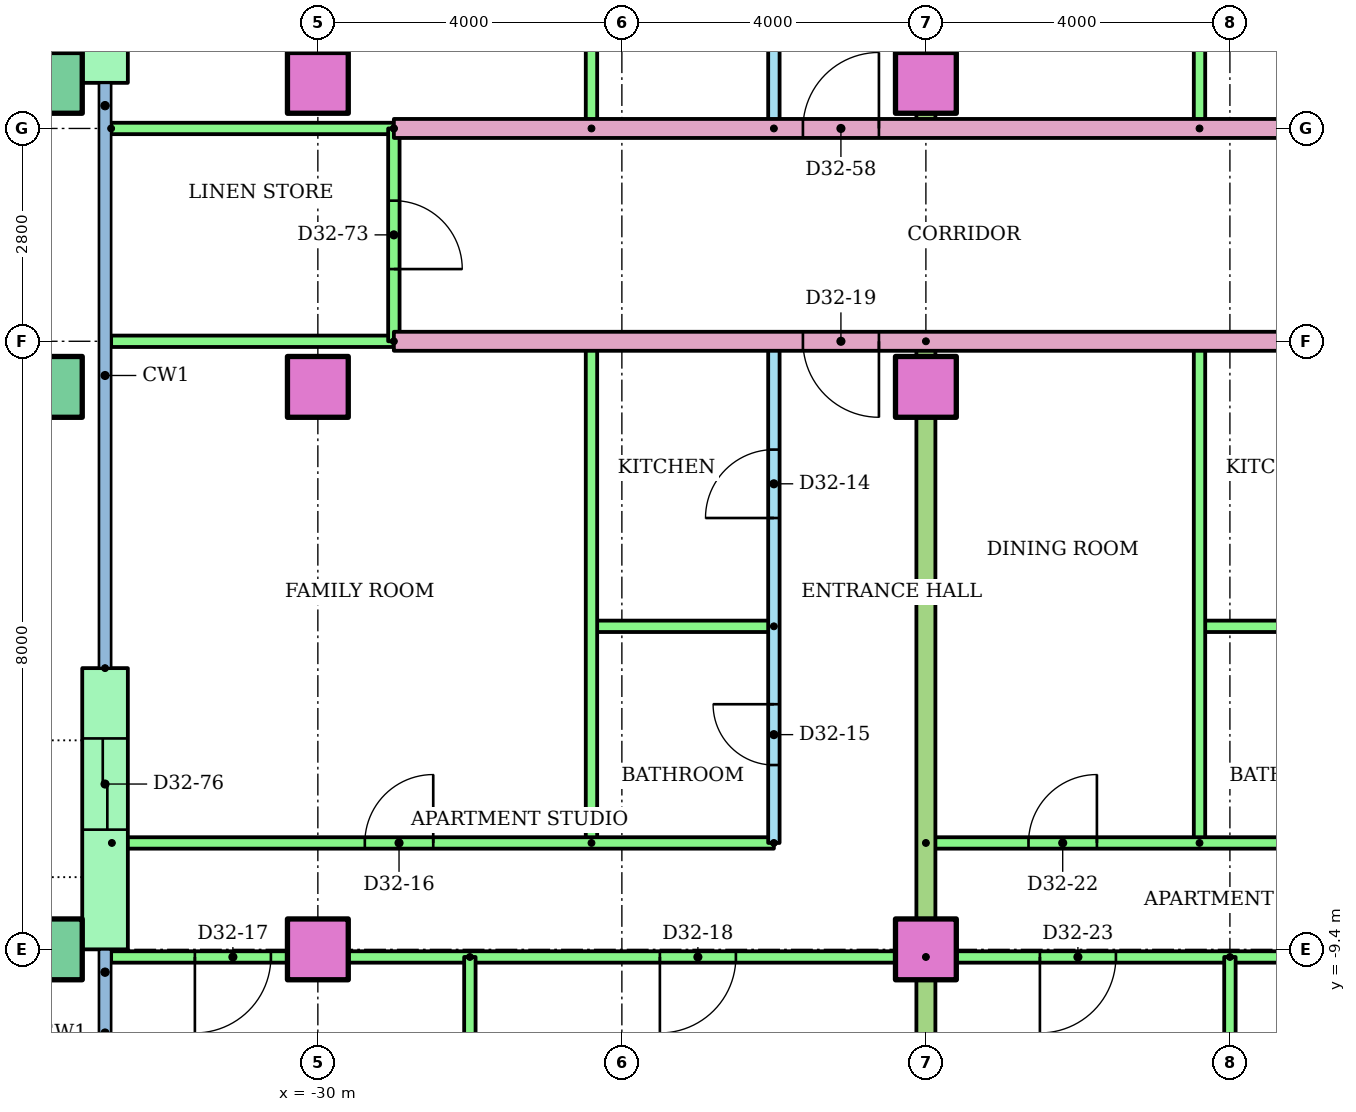
"""IFC4 building model, lengths in metres.
Left out: names, types, materials, properties, quantities, classifications, styles, units other than length and angle.
Written with IfcOpenShell. Run it as: python <this file> out.ifc"""

import sys

from ifc_helpers import new_model, si_unit, direction, frame, frame_2d, origin, origin_2d, place, context, subcontext, project, spatial, rectangle, hollow_rectangle, extrude, element, fill, save


model = new_model("IFC4")
c1 = context("Model", 3, precision=1e-05, world=origin(), true_north=direction((0.0, 1.0)))
c2 = subcontext(c1, "Body", "Model", "MODEL_VIEW")
j1 = project(units=[si_unit("LENGTHUNIT", "METRE"), si_unit("PLANEANGLEUNIT", "RADIAN")], contexts=[c1])
p1 = place(None, origin())
s1 = spatial("IfcSite", under=j1, at=p1, CompositionType="ELEMENT")
p2 = place(p1, origin())
s2 = spatial("IfcBuilding", under=s1, at=p2, CompositionType="ELEMENT")
p3 = place(p2, frame((0.0, 0.0, 126.2)))
s3 = spatial("IfcBuildingStorey", under=s2, at=p3, CompositionType="ELEMENT", Elevation=126.2)
p4 = place(p3, frame((-33.5, -9.4, 0.0)))
e1 = element("IfcColumn", 1, at=p4, inside=s3, PredefinedType="COLUMN", context=c2, shape_type="SweptSolid", body=[
    extrude(hollow_rectangle(XDim=0.8, YDim=0.8, WallThickness=0.04, at=origin_2d()), origin(), (0.0, 0.0, 1.0), 3.2),
])
for number, where in (
    (2, (-30.0, -9.4, 0.0)),
    (3, (-22.0, -9.4, 0.0)),
):
    element("IfcColumn", number, at=place(p3, frame(where)), inside=s3, PredefinedType="COLUMN", context=c2, shape_type="SweptSolid", body=[
        extrude(rectangle(XDim=0.8, YDim=0.8, at=origin_2d()), origin(), (0.0, 0.0, 1.0), 3.2),
    ])
p5 = place(p3, frame((-33.5, -2.0, 0.0)))
e4 = element("IfcColumn", 4, at=p5, inside=s3, PredefinedType="COLUMN", context=c2, shape_type="SweptSolid", body=[
    extrude(hollow_rectangle(XDim=0.8, YDim=0.8, WallThickness=0.04, at=origin_2d()), origin(), (0.0, 0.0, 1.0), 3.2),
])
for number, where in (
    (5, (-30.0, -2.0, 0.0)),
    (6, (-22.0, -2.0, 0.0)),
):
    element("IfcColumn", number, at=place(p3, frame(where)), inside=s3, PredefinedType="COLUMN", context=c2, shape_type="SweptSolid", body=[
        extrude(rectangle(XDim=0.8, YDim=0.8, at=origin_2d()), origin(), (0.0, 0.0, 1.0), 3.2),
    ])
p6 = place(p3, frame((-33.5, 2.0, 0.0)))
e7 = element("IfcColumn", 7, at=p6, inside=s3, PredefinedType="COLUMN", context=c2, shape_type="SweptSolid", body=[
    extrude(hollow_rectangle(XDim=0.8, YDim=0.8, WallThickness=0.04, at=origin_2d()), origin(), (0.0, 0.0, 1.0), 3.2),
])
for number, where in (
    (8, (-30.0, 2.0, 0.0)),
    (9, (-22.0, 2.0, 0.0)),
):
    element("IfcColumn", number, at=place(p3, frame(where)), inside=s3, PredefinedType="COLUMN", context=c2, shape_type="SweptSolid", body=[
        extrude(rectangle(XDim=0.8, YDim=0.8, at=origin_2d()), origin(), (0.0, 0.0, 1.0), 3.2),
    ])
p7 = place(p3, frame((-32.8, 6.5, 0.0), z_axis=(0.0, 0.0, 1.0), x_axis=(0.0, -1.0, 0.0)))
e10 = element("IfcWall", 10, at=p7, inside=s3, PredefinedType="STANDARD", context=c2, shape_type="SweptSolid", body=[
    extrude(rectangle(XDim=4.5, YDim=0.6, at=frame_2d((2.25, 0.0))), origin(), (0.0, 0.0, 1.0), 2.92),
])
p8 = place(p7, frame((1.65, 0.0, 0.0)))
e11 = element("IfcOpeningElement", 11, at=p8, cuts=e10, PredefinedType="OPENING", context=c2, shape_type="SweptSolid", body=[
    extrude(rectangle(XDim=1.2, YDim=2.1, at=frame_2d((0.6, 1.05))), frame((0.0, 0.31, 0.0), z_axis=(0.0, -1.0, 0.0), x_axis=(1.0, 0.0, 0.0)), (0.0, 0.0, 1.0), 0.62),
])
p9 = place(p3, frame((-32.8, -5.7, 0.0), z_axis=(0.0, 0.0, 1.0), x_axis=(0.0, -1.0, 0.0)))
e12 = element("IfcWall", 12, at=p9, inside=s3, PredefinedType="STANDARD", context=c2, shape_type="SweptSolid", body=[
    extrude(rectangle(XDim=3.7, YDim=0.6, at=frame_2d((1.85, 0.0))), origin(), (0.0, 0.0, 1.0), 2.92),
])
p10 = place(p9, frame((0.925, 0.0, 0.0)))
e13 = element("IfcOpeningElement", 13, at=p10, cuts=e12, PredefinedType="OPENING", context=c2, shape_type="SweptSolid", body=[
    extrude(rectangle(XDim=1.2, YDim=2.1, at=frame_2d((0.6, 1.05))), frame((0.0, 0.31, 0.0), z_axis=(0.0, -1.0, 0.0), x_axis=(1.0, 0.0, 0.0)), (0.0, 0.0, 1.0), 0.62),
])
p11 = place(p3, frame((-24.0, -8.0, 0.0), z_axis=(0.0, 0.0, 1.0), x_axis=(0.0, 1.0, 0.0)))
e14 = element("IfcWall", 14, at=p11, inside=s3, PredefinedType="PARTITIONING", context=c2, shape_type="SweptSolid", body=[
    extrude(rectangle(XDim=6.6, YDim=0.15, at=frame_2d((3.3, 0.0))), origin(), (0.0, 0.0, 1.0), 2.4),
])
p12 = place(p11, frame((4.275, 0.0, 0.0)))
e15 = element("IfcOpeningElement", 15, at=p12, cuts=e14, PredefinedType="OPENING", context=c2, shape_type="SweptSolid", body=[
    extrude(rectangle(XDim=0.9, YDim=2.1, at=frame_2d((0.45, 1.05))), frame((0.0, 0.085, 0.0), z_axis=(0.0, -1.0, 0.0), x_axis=(1.0, 0.0, 0.0)), (0.0, 0.0, 1.0), 0.17),
])
p13 = place(p11, frame((1.025, 0.0, 0.0)))
e16 = element("IfcOpeningElement", 16, at=p13, cuts=e14, PredefinedType="OPENING", context=c2, shape_type="SweptSolid", body=[
    extrude(rectangle(XDim=0.8, YDim=2.1, at=frame_2d((0.4, 1.05))), frame((0.0, 0.085, 0.0), z_axis=(0.0, -1.0, 0.0), x_axis=(1.0, 0.0, 0.0)), (0.0, 0.0, 1.0), 0.17),
])
p14 = place(p3, frame((-24.0, -5.15, 0.0), z_axis=(0.0, 0.0, 1.0), x_axis=(-1.0, 0.0, 0.0)))
e17 = element("IfcWall", 17, at=p14, inside=s3, PredefinedType="PARTITIONING", context=c2, shape_type="SweptSolid", body=[
    extrude(rectangle(XDim=2.4, YDim=0.15, at=frame_2d((1.2, 0.0))), origin(), (0.0, 0.0, 1.0), 2.4),
])
p15 = place(p3, frame((-26.4, -8.0, 0.0), z_axis=(0.0, 0.0, 1.0), x_axis=(0.0, 1.0, 0.0)))
e18 = element("IfcWall", 18, at=p15, inside=s3, PredefinedType="PARTITIONING", context=c2, shape_type="SweptSolid", body=[
    extrude(rectangle(XDim=6.6, YDim=0.15, at=frame_2d((3.3, 0.0))), origin(), (0.0, 0.0, 1.0), 2.4),
])
p16 = place(p3, frame((-32.71, -8.0, 0.0)))
e19 = element("IfcWall", 19, at=p16, inside=s3, PredefinedType="PARTITIONING", context=c2, shape_type="SweptSolid", body=[
    extrude(rectangle(XDim=8.71, YDim=0.15, at=frame_2d((4.355, 0.0))), origin(), (0.0, 0.0, 1.0), 2.4),
])
p17 = place(p16, frame((3.328, 0.0, 0.0)))
e20 = element("IfcOpeningElement", 20, at=p17, cuts=e19, PredefinedType="OPENING", context=c2, shape_type="SweptSolid", body=[
    extrude(rectangle(XDim=0.9, YDim=2.1, at=frame_2d((0.45, 1.05))), frame((0.0, 0.085, 0.0), z_axis=(0.0, -1.0, 0.0), x_axis=(1.0, 0.0, 0.0)), (0.0, 0.0, 1.0), 0.17),
])
p18 = place(p3, frame((-22.0, -9.5, 0.0), z_axis=(0.0, 0.0, 1.0), x_axis=(-1.0, 0.0, 0.0)))
e21 = element("IfcWall", 21, at=p18, inside=s3, PredefinedType="PARTITIONING", context=c2, shape_type="SweptSolid", body=[
    extrude(rectangle(XDim=10.72, YDim=0.15, at=frame_2d((5.36, 0.0))), origin(), (0.0, 0.0, 1.0), 2.4),
])
p19 = place(p18, frame((8.618, 0.0, 0.0)))
e22 = element("IfcOpeningElement", 22, at=p19, cuts=e21, PredefinedType="OPENING", context=c2, shape_type="SweptSolid", body=[
    extrude(rectangle(XDim=1.0, YDim=2.1, at=frame_2d((0.5, 1.05))), frame((0.0, 0.085, 0.0), z_axis=(0.0, -1.0, 0.0), x_axis=(1.0, 0.0, 0.0)), (0.0, 0.0, 1.0), 0.17),
])
p20 = place(p18, frame((2.5, 0.0, 0.0)))
e23 = element("IfcOpeningElement", 23, at=p20, cuts=e21, PredefinedType="OPENING", context=c2, shape_type="SweptSolid", body=[
    extrude(rectangle(XDim=1.0, YDim=2.1, at=frame_2d((0.5, 1.05))), frame((0.0, 0.085, 0.0), z_axis=(0.0, -1.0, 0.0), x_axis=(1.0, 0.0, 0.0)), (0.0, 0.0, 1.0), 0.17),
])
p21 = place(p3, frame((-28.0, -9.5, 0.0), z_axis=(0.0, 0.0, 1.0), x_axis=(0.0, -1.0, 0.0)))
e24 = element("IfcWall", 24, at=p21, inside=s3, PredefinedType="PARTITIONING", context=c2, shape_type="SweptSolid", body=[
    extrude(rectangle(XDim=5.02, YDim=0.15, at=frame_2d((2.51, 0.0))), origin(), (0.0, 0.0, 1.0), 2.4),
])
p22 = place(p3, frame((-16.0, -5.15, 0.0), z_axis=(0.0, 0.0, 1.0), x_axis=(-1.0, 0.0, 0.0)))
e25 = element("IfcWall", 25, at=p22, inside=s3, PredefinedType="PARTITIONING", context=c2, shape_type="SweptSolid", body=[
    extrude(rectangle(XDim=2.4, YDim=0.15, at=frame_2d((1.2, 0.0))), origin(), (0.0, 0.0, 1.0), 2.4),
])
p23 = place(p3, frame((-18.4, -8.0, 0.0), z_axis=(0.0, 0.0, 1.0), x_axis=(0.0, 1.0, 0.0)))
e26 = element("IfcWall", 26, at=p23, inside=s3, PredefinedType="PARTITIONING", context=c2, shape_type="SweptSolid", body=[
    extrude(rectangle(XDim=6.6, YDim=0.15, at=frame_2d((3.3, 0.0))), origin(), (0.0, 0.0, 1.0), 2.4),
])
p24 = place(p3, frame((-22.0, -8.0, 0.0)))
e27 = element("IfcWall", 27, at=p24, inside=s3, PredefinedType="PARTITIONING", context=c2, shape_type="SweptSolid", body=[
    extrude(rectangle(XDim=6.0, YDim=0.15, at=frame_2d((3.0, 0.0))), origin(), (0.0, 0.0, 1.0), 2.4),
])
p25 = place(p24, frame((1.35, 0.0, 0.0)))
e28 = element("IfcOpeningElement", 28, at=p25, cuts=e27, PredefinedType="OPENING", context=c2, shape_type="SweptSolid", body=[
    extrude(rectangle(XDim=0.9, YDim=2.1, at=frame_2d((0.45, 1.05))), frame((0.0, 0.085, 0.0), z_axis=(0.0, -1.0, 0.0), x_axis=(1.0, 0.0, 0.0)), (0.0, 0.0, 1.0), 0.17),
])
p26 = place(p3, frame((-14.0, -9.5, 0.0), z_axis=(0.0, 0.0, 1.0), x_axis=(-1.0, 0.0, 0.0)))
e29 = element("IfcWall", 29, at=p26, inside=s3, PredefinedType="PARTITIONING", context=c2, shape_type="SweptSolid", body=[
    extrude(rectangle(XDim=8.0, YDim=0.15, at=frame_2d((4.0, 0.0))), origin(), (0.0, 0.0, 1.0), 2.4),
])
p27 = place(p26, frame((5.5, 0.0, 0.0)))
e30 = element("IfcOpeningElement", 30, at=p27, cuts=e29, PredefinedType="OPENING", context=c2, shape_type="SweptSolid", body=[
    extrude(rectangle(XDim=1.0, YDim=2.1, at=frame_2d((0.5, 1.05))), frame((0.0, 0.085, 0.0), z_axis=(0.0, -1.0, 0.0), x_axis=(1.0, 0.0, 0.0)), (0.0, 0.0, 1.0), 0.17),
])
p28 = place(p26, frame((1.5, 0.0, 0.0)))
e31 = element("IfcOpeningElement", 31, at=p28, cuts=e29, PredefinedType="OPENING", context=c2, shape_type="SweptSolid", body=[
    extrude(rectangle(XDim=1.0, YDim=2.1, at=frame_2d((0.5, 1.05))), frame((0.0, 0.085, 0.0), z_axis=(0.0, -1.0, 0.0), x_axis=(1.0, 0.0, 0.0)), (0.0, 0.0, 1.0), 0.17),
])
p29 = place(p3, frame((-18.0, -9.5, 0.0), z_axis=(0.0, 0.0, 1.0), x_axis=(0.0, -1.0, 0.0)))
e32 = element("IfcWall", 32, at=p29, inside=s3, PredefinedType="PARTITIONING", context=c2, shape_type="SweptSolid", body=[
    extrude(rectangle(XDim=6.821, YDim=0.15, at=frame_2d((3.411, 0.0))), origin(), (0.0, 0.0, 1.0), 2.4),
])
p30 = place(p3, frame((-22.0, -1.4, 0.0), z_axis=(0.0, 0.0, 1.0), x_axis=(0.0, -1.0, 0.0)))
e33 = element("IfcWall", 33, at=p30, inside=s3, PredefinedType="PARTITIONING", context=c2, shape_type="SweptSolid", body=[
    extrude(rectangle(XDim=14.91, YDim=0.25, at=frame_2d((7.455, 0.0))), origin(), (0.0, 0.0, 1.0), 2.4),
])
p31 = place(p3, frame((-14.0, -1.4, 0.0), z_axis=(0.0, 0.0, 1.0), x_axis=(-1.0, 0.0, 0.0)))
e34 = element("IfcWall", 34, at=p31, inside=s3, PredefinedType="PARTITIONING", context=c2, shape_type="SweptSolid", body=[
    extrude(rectangle(XDim=15.0, YDim=0.25, at=frame_2d((7.5, 0.0))), origin(), (0.0, 0.0, 1.0), 2.4),
])
p32 = place(p31, frame((8.618, 0.0, 0.0)))
e35 = element("IfcOpeningElement", 35, at=p32, cuts=e34, PredefinedType="OPENING", context=c2, shape_type="SweptSolid", body=[
    extrude(rectangle(XDim=1.0, YDim=2.1, at=frame_2d((0.5, 1.05))), frame((0.0, 0.135, 0.0), z_axis=(0.0, -1.0, 0.0), x_axis=(1.0, 0.0, 0.0)), (0.0, 0.0, 1.0), 0.27),
])
p33 = place(p31, frame((0.618, 0.0, 0.0)))
e36 = element("IfcOpeningElement", 36, at=p33, cuts=e34, PredefinedType="OPENING", context=c2, shape_type="SweptSolid", body=[
    extrude(rectangle(XDim=1.0, YDim=2.1, at=frame_2d((0.5, 1.05))), frame((0.0, 0.135, 0.0), z_axis=(0.0, -1.0, 0.0), x_axis=(1.0, 0.0, 0.0)), (0.0, 0.0, 1.0), 0.27),
])
p34 = place(p3, frame((-29.0, -1.4, 0.0), z_axis=(0.0, 0.0, 1.0), x_axis=(-1.0, 0.0, 0.0)))
e37 = element("IfcWall", 37, at=p34, inside=s3, PredefinedType="PARTITIONING", context=c2, shape_type="SweptSolid", body=[
    extrude(rectangle(XDim=3.72, YDim=0.15, at=frame_2d((1.86, 0.0))), origin(), (0.0, 0.0, 1.0), 2.4),
])
p35 = place(p3, frame((-24.0, 1.4, 0.0), z_axis=(0.0, 0.0, 1.0), x_axis=(0.0, 1.0, 0.0)))
e38 = element("IfcWall", 38, at=p35, inside=s3, PredefinedType="PARTITIONING", context=c2, shape_type="SweptSolid", body=[
    extrude(rectangle(XDim=9.0, YDim=0.15, at=frame_2d((4.5, 0.0))), origin(), (0.0, 0.0, 1.0), 2.4),
])
p36 = place(p35, frame((2.05, 0.0, 0.0)))
e39 = element("IfcOpeningElement", 39, at=p36, cuts=e38, PredefinedType="OPENING", context=c2, shape_type="SweptSolid", body=[
    extrude(rectangle(XDim=0.9, YDim=2.1, at=frame_2d((0.45, 1.05))), frame((0.0, 0.085, 0.0), z_axis=(0.0, -1.0, 0.0), x_axis=(1.0, 0.0, 0.0)), (0.0, 0.0, 1.0), 0.17),
])
p37 = place(p35, frame((6.6, 0.0, 0.0)))
e40 = element("IfcOpeningElement", 40, at=p37, cuts=e38, PredefinedType="OPENING", context=c2, shape_type="SweptSolid", body=[
    extrude(rectangle(XDim=0.8, YDim=2.1, at=frame_2d((0.4, 1.05))), frame((0.0, 0.085, 0.0), z_axis=(0.0, -1.0, 0.0), x_axis=(1.0, 0.0, 0.0)), (0.0, 0.0, 1.0), 0.17),
])
for number, where, z_axis, x_axis in (
    (41, (-26.4, 1.4, 0.0), (0.0, 0.0, 1.0), (0.0, 1.0, 0.0)),
    (42, (-18.4, 1.4, 0.0), (0.0, 0.0, 1.0), (0.0, 1.0, 0.0)),
):
    element("IfcWall", number, at=place(p3, frame(where, z_axis=z_axis, x_axis=x_axis)), inside=s3, PredefinedType="PARTITIONING", context=c2, shape_type="SweptSolid", body=[
        extrude(rectangle(XDim=9.0, YDim=0.15, at=frame_2d((4.5, 0.0))), origin(), (0.0, 0.0, 1.0), 2.4),
    ])
p38 = place(p3, frame((-22.0, 18.721, 0.0), z_axis=(0.0, 0.0, 1.0), x_axis=(0.0, -1.0, 0.0)))
e43 = element("IfcWall", 43, at=p38, inside=s3, PredefinedType="PARTITIONING", context=c2, shape_type="SweptSolid", body=[
    extrude(rectangle(XDim=17.321, YDim=0.25, at=frame_2d((8.661, 0.0))), origin(), (0.0, 0.0, 1.0), 2.4),
])
p39 = place(p3, frame((-29.0, 1.4, 0.0)))
e44 = element("IfcWall", 44, at=p39, inside=s3, PredefinedType="PARTITIONING", context=c2, shape_type="SweptSolid", body=[
    extrude(rectangle(XDim=15.0, YDim=0.25, at=frame_2d((7.5, 0.0))), origin(), (0.0, 0.0, 1.0), 2.4),
])
p40 = place(p39, frame((5.382, 0.0, 0.0)))
e45 = element("IfcOpeningElement", 45, at=p40, cuts=e44, PredefinedType="OPENING", context=c2, shape_type="SweptSolid", body=[
    extrude(rectangle(XDim=1.0, YDim=2.1, at=frame_2d((0.5, 1.05))), frame((0.0, 0.135, 0.0), z_axis=(0.0, -1.0, 0.0), x_axis=(1.0, 0.0, 0.0)), (0.0, 0.0, 1.0), 0.27),
])
p41 = place(p39, frame((13.5, 0.0, 0.0)))
e46 = element("IfcOpeningElement", 46, at=p41, cuts=e44, PredefinedType="OPENING", context=c2, shape_type="SweptSolid", body=[
    extrude(rectangle(XDim=1.0, YDim=2.1, at=frame_2d((0.5, 1.05))), frame((0.0, 0.135, 0.0), z_axis=(0.0, -1.0, 0.0), x_axis=(1.0, 0.0, 0.0)), (0.0, 0.0, 1.0), 0.27),
])
p42 = place(p3, frame((-32.72, 1.4, 0.0)))
e47 = element("IfcWall", 47, at=p42, inside=s3, PredefinedType="PARTITIONING", context=c2, shape_type="SweptSolid", body=[
    extrude(rectangle(XDim=3.72, YDim=0.15, at=frame_2d((1.86, 0.0))), origin(), (0.0, 0.0, 1.0), 2.4),
])
p43 = place(p3, frame((-29.0, 1.4, 0.0), z_axis=(0.0, 0.0, 1.0), x_axis=(0.0, -1.0, 0.0)))
e48 = element("IfcWall", 48, at=p43, inside=s3, PredefinedType="PARTITIONING", context=c2, shape_type="SweptSolid", body=[
    extrude(rectangle(XDim=2.8, YDim=0.15, at=frame_2d((1.4, 0.0))), origin(), (0.0, 0.0, 1.0), 2.4),
])
p44 = place(p43, frame((0.95, 0.0, 0.0)))
e49 = element("IfcOpeningElement", 49, at=p44, cuts=e48, PredefinedType="OPENING", context=c2, shape_type="SweptSolid", body=[
    extrude(rectangle(XDim=0.9, YDim=2.1, at=frame_2d((0.45, 1.05))), frame((0.0, 0.085, 0.0), z_axis=(0.0, -1.0, 0.0), x_axis=(1.0, 0.0, 0.0)), (0.0, 0.0, 1.0), 0.17),
])
p45 = place(p12, origin())
e50 = element("IfcDoor", 50, at=p45, inside=s3, OperationType="SINGLE_SWING_LEFT", PredefinedType="DOOR", context=c2, shape_type="SweptSolid", body=[
    extrude(rectangle(XDim=0.9, YDim=2.1, at=frame_2d((0.45, 1.05))), frame((0.0, 0.025, 0.0), z_axis=(0.0, -1.0, 0.0), x_axis=(1.0, 0.0, 0.0)), (0.0, 0.0, 1.0), 0.05),
])
fill(e15, e50)
p46 = place(p13, origin())
e51 = element("IfcDoor", 51, at=p46, inside=s3, OperationType="SINGLE_SWING_RIGHT", PredefinedType="DOOR", context=c2, shape_type="SweptSolid", body=[
    extrude(rectangle(XDim=0.8, YDim=2.1, at=frame_2d((0.4, 1.05))), frame((0.0, 0.025, 0.0), z_axis=(0.0, -1.0, 0.0), x_axis=(1.0, 0.0, 0.0)), (0.0, 0.0, 1.0), 0.05),
])
fill(e16, e51)
p47 = place(p17, origin())
e52 = element("IfcDoor", 52, at=p47, inside=s3, OperationType="SINGLE_SWING_RIGHT", PredefinedType="DOOR", context=c2, shape_type="SweptSolid", body=[
    extrude(rectangle(XDim=0.9, YDim=2.1, at=frame_2d((0.45, 1.05))), frame((0.0, 0.025, 0.0), z_axis=(0.0, -1.0, 0.0), x_axis=(1.0, 0.0, 0.0)), (0.0, 0.0, 1.0), 0.05),
])
fill(e20, e52)
p48 = place(p19, origin())
e53 = element("IfcDoor", 53, at=p48, inside=s3, OperationType="SINGLE_SWING_RIGHT", PredefinedType="DOOR", context=c2, shape_type="SweptSolid", body=[
    extrude(rectangle(XDim=1.0, YDim=2.1, at=frame_2d((0.5, 1.05))), frame((0.0, 0.025, 0.0), z_axis=(0.0, -1.0, 0.0), x_axis=(1.0, 0.0, 0.0)), (0.0, 0.0, 1.0), 0.05),
])
fill(e22, e53)
p49 = place(p20, origin())
e54 = element("IfcDoor", 54, at=p49, inside=s3, OperationType="SINGLE_SWING_RIGHT", PredefinedType="DOOR", context=c2, shape_type="SweptSolid", body=[
    extrude(rectangle(XDim=1.0, YDim=2.1, at=frame_2d((0.5, 1.05))), frame((0.0, 0.025, 0.0), z_axis=(0.0, -1.0, 0.0), x_axis=(1.0, 0.0, 0.0)), (0.0, 0.0, 1.0), 0.05),
])
fill(e23, e54)
p50 = place(p32, origin())
e55 = element("IfcDoor", 55, at=p50, inside=s3, OperationType="SINGLE_SWING_LEFT", PredefinedType="DOOR", context=c2, shape_type="SweptSolid", body=[
    extrude(rectangle(XDim=1.0, YDim=2.1, at=frame_2d((0.5, 1.05))), frame((0.0, 0.025, 0.0), z_axis=(0.0, -1.0, 0.0), x_axis=(1.0, 0.0, 0.0)), (0.0, 0.0, 1.0), 0.05),
])
fill(e35, e55)
p51 = place(p25, origin())
e56 = element("IfcDoor", 56, at=p51, inside=s3, OperationType="SINGLE_SWING_RIGHT", PredefinedType="DOOR", context=c2, shape_type="SweptSolid", body=[
    extrude(rectangle(XDim=0.9, YDim=2.1, at=frame_2d((0.45, 1.05))), frame((0.0, 0.025, 0.0), z_axis=(0.0, -1.0, 0.0), x_axis=(1.0, 0.0, 0.0)), (0.0, 0.0, 1.0), 0.05),
])
fill(e28, e56)
p52 = place(p27, origin())
e57 = element("IfcDoor", 57, at=p52, inside=s3, OperationType="SINGLE_SWING_RIGHT", PredefinedType="DOOR", context=c2, shape_type="SweptSolid", body=[
    extrude(rectangle(XDim=1.0, YDim=2.1, at=frame_2d((0.5, 1.05))), frame((0.0, 0.025, 0.0), z_axis=(0.0, -1.0, 0.0), x_axis=(1.0, 0.0, 0.0)), (0.0, 0.0, 1.0), 0.05),
])
fill(e30, e57)
p53 = place(p40, origin())
e58 = element("IfcDoor", 58, at=p53, inside=s3, OperationType="SINGLE_SWING_RIGHT", PredefinedType="DOOR", context=c2, shape_type="SweptSolid", body=[
    extrude(rectangle(XDim=1.0, YDim=2.1, at=frame_2d((0.5, 1.05))), frame((0.0, 0.025, 0.0), z_axis=(0.0, -1.0, 0.0), x_axis=(1.0, 0.0, 0.0)), (0.0, 0.0, 1.0), 0.05),
])
fill(e45, e58)
p54 = place(p44, origin())
e59 = element("IfcDoor", 59, at=p54, inside=s3, OperationType="SINGLE_SWING_RIGHT", PredefinedType="DOOR", context=c2, shape_type="SweptSolid", body=[
    extrude(rectangle(XDim=0.9, YDim=2.1, at=frame_2d((0.45, 1.05))), frame((0.0, 0.025, 0.0), z_axis=(0.0, -1.0, 0.0), x_axis=(1.0, 0.0, 0.0)), (0.0, 0.0, 1.0), 0.05),
])
fill(e49, e59)
p55 = place(p10, origin())
e60 = element("IfcDoor", 60, at=p55, inside=s3, OperationType="SLIDING_TO_LEFT", PredefinedType="DOOR", context=c2, shape_type="SweptSolid", body=[
    extrude(rectangle(XDim=1.2, YDim=2.1, at=frame_2d((0.6, 1.05))), frame((0.0, 0.025, 0.0), z_axis=(0.0, -1.0, 0.0), x_axis=(1.0, 0.0, 0.0)), (0.0, 0.0, 1.0), 0.05),
])
fill(e13, e60)
save(model, sys.argv[1])
